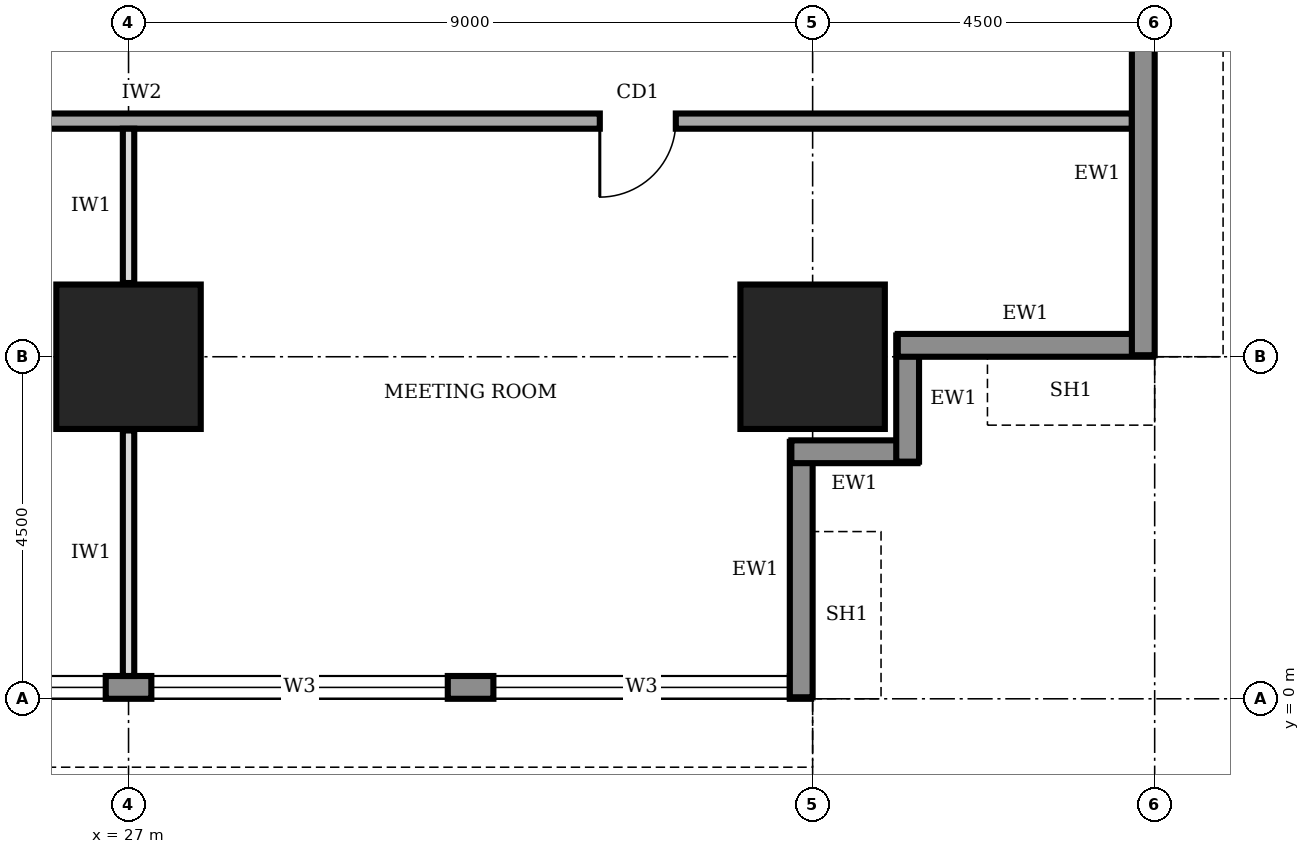
"""IFC4 building model, lengths in metres.
Left out: names, types, materials, properties, quantities, classifications, styles, units other than length and angle.
Written with IfcOpenShell. Run it as: python <this file> out.ifc"""

import sys

from ifc_helpers import new_model, si_unit, direction, frame, frame_2d, origin, origin_2d, place, context, subcontext, project, spatial, rectangle, extrude, element, fill, save


model = new_model("IFC4")
c1 = context("Model", 3, precision=1e-05, world=origin(), true_north=direction((0.0, 1.0)))
c2 = subcontext(c1, "Body", "Model", "MODEL_VIEW")
j1 = project(units=[si_unit("LENGTHUNIT", "METRE"), si_unit("PLANEANGLEUNIT", "RADIAN")], contexts=[c1])
p1 = place(None, origin())
s1 = spatial("IfcSite", under=j1, at=p1, CompositionType="ELEMENT")
p2 = place(p1, origin())
s2 = spatial("IfcBuilding", under=s1, at=p2, CompositionType="ELEMENT")
p3 = place(p2, frame((0.0, 0.0, 93.0)))
s3 = spatial("IfcBuildingStorey", under=s2, at=p3, CompositionType="ELEMENT", Elevation=93.0)
for number, where, z_axis, x_axis in (
    (1, (27.0, 4.5, 0.0), (0.0, 0.0, 1.0), (1.0, 0.0, 0.0)),
    (2, (36.0, 4.5, 0.0), (0.0, 0.0, 1.0), (1.0, 0.0, 0.0)),
):
    element("IfcColumn", number, at=place(p3, frame(where, z_axis=z_axis, x_axis=x_axis)), inside=s3, PredefinedType="COLUMN", context=c2, shape_type="SweptSolid", body=[
        extrude(rectangle(XDim=1.9, YDim=1.9, at=origin_2d()), origin(), (0.0, 0.0, 1.0), 4.0),
    ])
p4 = place(p3, frame((4.52, 0.15, 0.0), z_axis=(0.0, 0.0, 1.0), x_axis=(1.0, 0.0, 0.0)))
e3 = element("IfcWall", 3, at=p4, inside=s3, PredefinedType="STANDARD", context=c2, shape_type="SweptSolid", body=[
    extrude(rectangle(XDim=31.46, YDim=0.3, at=frame_2d((15.73, 0.0))), origin(), (0.0, 0.0, 1.0), 3.75),
])
p5 = place(p4, frame((4.78, 0.0, 0.95)))
e4 = element("IfcOpeningElement", 4, at=p5, cuts=e3, PredefinedType="OPENING", context=c2, shape_type="SweptSolid", body=[
    extrude(rectangle(XDim=3.9, YDim=1.8, at=frame_2d((1.95, 0.9))), frame((0.0, 0.16, 0.0), z_axis=(0.0, -1.0, 0.0), x_axis=(1.0, 0.0, 0.0)), (0.0, 0.0, 1.0), 0.32),
])
p6 = place(p4, frame((9.28, 0.0, 0.95)))
e5 = element("IfcOpeningElement", 5, at=p6, cuts=e3, PredefinedType="OPENING", context=c2, shape_type="SweptSolid", body=[
    extrude(rectangle(XDim=3.9, YDim=1.8, at=frame_2d((1.95, 0.9))), frame((0.0, 0.16, 0.0), z_axis=(0.0, -1.0, 0.0), x_axis=(1.0, 0.0, 0.0)), (0.0, 0.0, 1.0), 0.32),
])
p7 = place(p4, frame((13.78, 0.0, 0.95)))
e6 = element("IfcOpeningElement", 6, at=p7, cuts=e3, PredefinedType="OPENING", context=c2, shape_type="SweptSolid", body=[
    extrude(rectangle(XDim=3.9, YDim=1.8, at=frame_2d((1.95, 0.9))), frame((0.0, 0.16, 0.0), z_axis=(0.0, -1.0, 0.0), x_axis=(1.0, 0.0, 0.0)), (0.0, 0.0, 1.0), 0.32),
])
p8 = place(p4, frame((18.28, 0.0, 0.95)))
e7 = element("IfcOpeningElement", 7, at=p8, cuts=e3, PredefinedType="OPENING", context=c2, shape_type="SweptSolid", body=[
    extrude(rectangle(XDim=3.9, YDim=1.8, at=frame_2d((1.95, 0.9))), frame((0.0, 0.16, 0.0), z_axis=(0.0, -1.0, 0.0), x_axis=(1.0, 0.0, 0.0)), (0.0, 0.0, 1.0), 0.32),
])
p9 = place(p4, frame((22.78, 0.0, 0.95)))
e8 = element("IfcOpeningElement", 8, at=p9, cuts=e3, PredefinedType="OPENING", context=c2, shape_type="SweptSolid", body=[
    extrude(rectangle(XDim=3.9, YDim=1.8, at=frame_2d((1.95, 0.9))), frame((0.0, 0.16, 0.0), z_axis=(0.0, -1.0, 0.0), x_axis=(1.0, 0.0, 0.0)), (0.0, 0.0, 1.0), 0.32),
])
p10 = place(p4, frame((27.28, 0.0, 0.95)))
e9 = element("IfcOpeningElement", 9, at=p10, cuts=e3, PredefinedType="OPENING", context=c2, shape_type="SweptSolid", body=[
    extrude(rectangle(XDim=3.9, YDim=1.8, at=frame_2d((1.95, 0.9))), frame((0.0, 0.16, 0.0), z_axis=(0.0, -1.0, 0.0), x_axis=(1.0, 0.0, 0.0)), (0.0, 0.0, 1.0), 0.32),
])
p11 = place(p3, frame((35.85, 0.02, 0.0), z_axis=(0.0, 0.0, 1.0), x_axis=(0.0, 1.0, 0.0)))
e10 = element("IfcWall", 10, at=p11, inside=s3, PredefinedType="STANDARD", context=c2, shape_type="SweptSolid", body=[
    extrude(rectangle(XDim=3.36, YDim=0.3, at=frame_2d((1.68, 0.0))), origin(), (0.0, 0.0, 1.0), 2.85),
])
for number, where, z_axis, x_axis in (
    (11, (35.72, 3.25, 0.0), (0.0, 0.0, 1.0), (1.0, 0.0, 0.0)),
    (12, (37.25, 3.12, 0.0), (0.0, 0.0, 1.0), (0.0, 1.0, 0.0)),
):
    element("IfcWall", number, at=place(p3, frame(where, z_axis=z_axis, x_axis=x_axis)), inside=s3, PredefinedType="STANDARD", context=c2, shape_type="SweptSolid", body=[
        extrude(rectangle(XDim=1.66, YDim=0.3, at=frame_2d((0.83, 0.0))), origin(), (0.0, 0.0, 1.0), 3.75),
    ])
p12 = place(p3, frame((37.12, 4.65, 0.0), z_axis=(0.0, 0.0, 1.0), x_axis=(1.0, 0.0, 0.0)))
e13 = element("IfcWall", 13, at=p12, inside=s3, PredefinedType="STANDARD", context=c2, shape_type="SweptSolid", body=[
    extrude(rectangle(XDim=3.36, YDim=0.3, at=frame_2d((1.68, 0.0))), origin(), (0.0, 0.0, 1.0), 2.85),
])
p13 = place(p3, frame((40.35, 4.52, 0.0), z_axis=(0.0, 0.0, 1.0), x_axis=(0.0, 1.0, 0.0)))
e14 = element("IfcWall", 14, at=p13, inside=s3, PredefinedType="STANDARD", context=c2, shape_type="SweptSolid", body=[
    extrude(rectangle(XDim=31.46, YDim=0.3, at=frame_2d((15.73, 0.0))), origin(), (0.0, 0.0, 1.0), 3.75),
])
p14 = place(p13, frame((4.78, 0.0, 0.95)))
e15 = element("IfcOpeningElement", 15, at=p14, cuts=e14, PredefinedType="OPENING", context=c2, shape_type="SweptSolid", body=[
    extrude(rectangle(XDim=3.9, YDim=1.8, at=frame_2d((1.95, 0.9))), frame((0.0, 0.16, 0.0), z_axis=(0.0, -1.0, 0.0), x_axis=(1.0, 0.0, 0.0)), (0.0, 0.0, 1.0), 0.32),
])
p15 = place(p13, frame((9.28, 0.0, 0.95)))
e16 = element("IfcOpeningElement", 16, at=p15, cuts=e14, PredefinedType="OPENING", context=c2, shape_type="SweptSolid", body=[
    extrude(rectangle(XDim=3.9, YDim=1.8, at=frame_2d((1.95, 0.9))), frame((0.0, 0.16, 0.0), z_axis=(0.0, -1.0, 0.0), x_axis=(1.0, 0.0, 0.0)), (0.0, 0.0, 1.0), 0.32),
])
p16 = place(p13, frame((13.78, 0.0, 0.95)))
e17 = element("IfcOpeningElement", 17, at=p16, cuts=e14, PredefinedType="OPENING", context=c2, shape_type="SweptSolid", body=[
    extrude(rectangle(XDim=3.9, YDim=1.8, at=frame_2d((1.95, 0.9))), frame((0.0, 0.16, 0.0), z_axis=(0.0, -1.0, 0.0), x_axis=(1.0, 0.0, 0.0)), (0.0, 0.0, 1.0), 0.32),
])
p17 = place(p13, frame((18.28, 0.0, 0.95)))
e18 = element("IfcOpeningElement", 18, at=p17, cuts=e14, PredefinedType="OPENING", context=c2, shape_type="SweptSolid", body=[
    extrude(rectangle(XDim=3.9, YDim=1.8, at=frame_2d((1.95, 0.9))), frame((0.0, 0.16, 0.0), z_axis=(0.0, -1.0, 0.0), x_axis=(1.0, 0.0, 0.0)), (0.0, 0.0, 1.0), 0.32),
])
p18 = place(p13, frame((22.78, 0.0, 0.95)))
e19 = element("IfcOpeningElement", 19, at=p18, cuts=e14, PredefinedType="OPENING", context=c2, shape_type="SweptSolid", body=[
    extrude(rectangle(XDim=3.9, YDim=1.8, at=frame_2d((1.95, 0.9))), frame((0.0, 0.16, 0.0), z_axis=(0.0, -1.0, 0.0), x_axis=(1.0, 0.0, 0.0)), (0.0, 0.0, 1.0), 0.32),
])
p19 = place(p13, frame((27.28, 0.0, 0.95)))
e20 = element("IfcOpeningElement", 20, at=p19, cuts=e14, PredefinedType="OPENING", context=c2, shape_type="SweptSolid", body=[
    extrude(rectangle(XDim=3.9, YDim=1.8, at=frame_2d((1.95, 0.9))), frame((0.0, 0.16, 0.0), z_axis=(0.0, -1.0, 0.0), x_axis=(1.0, 0.0, 0.0)), (0.0, 0.0, 1.0), 0.32),
])
p20 = place(p3, frame((11.9, 7.6, 0.0), z_axis=(0.0, 0.0, 1.0), x_axis=(1.0, 0.0, 0.0)))
e21 = element("IfcWall", 21, at=p20, inside=s3, PredefinedType="SOLIDWALL", context=c2, shape_type="SweptSolid", body=[
    extrude(rectangle(XDim=28.3, YDim=0.2, at=frame_2d((14.15, 0.0))), origin(), (0.0, 0.0, 1.0), 3.75),
])
p21 = place(p20, frame((0.275, 0.0, 0.0)))
e22 = element("IfcOpeningElement", 22, at=p21, cuts=e21, PredefinedType="OPENING", context=c2, shape_type="SweptSolid", body=[
    extrude(rectangle(XDim=1.0, YDim=2.1, at=frame_2d((0.5, 1.05))), frame((0.0, 0.11, 0.0), z_axis=(0.0, -1.0, 0.0), x_axis=(1.0, 0.0, 0.0)), (0.0, 0.0, 1.0), 0.22),
])
p22 = place(p20, frame((7.45, 0.0, 0.0)))
e23 = element("IfcOpeningElement", 23, at=p22, cuts=e21, PredefinedType="OPENING", context=c2, shape_type="SweptSolid", body=[
    extrude(rectangle(XDim=1.8, YDim=2.1, at=frame_2d((0.9, 1.05))), frame((0.0, 0.11, 0.0), z_axis=(0.0, -1.0, 0.0), x_axis=(1.0, 0.0, 0.0)), (0.0, 0.0, 1.0), 0.22),
])
p23 = place(p20, frame((21.3, 0.0, 0.0)))
e24 = element("IfcOpeningElement", 24, at=p23, cuts=e21, PredefinedType="OPENING", context=c2, shape_type="SweptSolid", body=[
    extrude(rectangle(XDim=1.0, YDim=2.1, at=frame_2d((0.5, 1.05))), frame((0.0, 0.11, 0.0), z_axis=(0.0, -1.0, 0.0), x_axis=(1.0, 0.0, 0.0)), (0.0, 0.0, 1.0), 0.22),
])
p24 = place(p3, frame((27.0, 0.3, 0.0), z_axis=(0.0, 0.0, 1.0), x_axis=(0.0, 1.0, 0.0)))
e25 = element("IfcWall", 25, at=p24, inside=s3, PredefinedType="PARTITIONING", context=c2, shape_type="SweptSolid", body=[
    extrude(rectangle(XDim=3.23, YDim=0.15, at=frame_2d((1.615, 0.0))), origin(), (0.0, 0.0, 1.0), 2.85),
])
p25 = place(p3, frame((27.0, 5.47, 0.0), z_axis=(0.0, 0.0, 1.0), x_axis=(0.0, 1.0, 0.0)))
e26 = element("IfcWall", 26, at=p25, inside=s3, PredefinedType="PARTITIONING", context=c2, shape_type="SweptSolid", body=[
    extrude(rectangle(XDim=2.03, YDim=0.15, at=frame_2d((1.015, 0.0))), origin(), (0.0, 0.0, 1.0), 2.85),
])
p26 = place(p8, origin())
e27 = element("IfcWindow", 27, at=p26, inside=s3, PartitioningType="SINGLE_PANEL", PredefinedType="WINDOW", context=c2, shape_type="SweptSolid", body=[
    extrude(rectangle(XDim=3.9, YDim=1.8, at=frame_2d((1.95, 0.9))), frame((0.0, 0.03, 0.0), z_axis=(0.0, -1.0, 0.0), x_axis=(1.0, 0.0, 0.0)), (0.0, 0.0, 1.0), 0.06),
])
fill(e7, e27)
p27 = place(p9, origin())
e28 = element("IfcWindow", 28, at=p27, inside=s3, PartitioningType="SINGLE_PANEL", PredefinedType="WINDOW", context=c2, shape_type="SweptSolid", body=[
    extrude(rectangle(XDim=3.9, YDim=1.8, at=frame_2d((1.95, 0.9))), frame((0.0, 0.03, 0.0), z_axis=(0.0, -1.0, 0.0), x_axis=(1.0, 0.0, 0.0)), (0.0, 0.0, 1.0), 0.06),
])
fill(e8, e28)
p28 = place(p10, origin())
e29 = element("IfcWindow", 29, at=p28, inside=s3, PartitioningType="SINGLE_PANEL", PredefinedType="WINDOW", context=c2, shape_type="SweptSolid", body=[
    extrude(rectangle(XDim=3.9, YDim=1.8, at=frame_2d((1.95, 0.9))), frame((0.0, 0.03, 0.0), z_axis=(0.0, -1.0, 0.0), x_axis=(1.0, 0.0, 0.0)), (0.0, 0.0, 1.0), 0.06),
])
fill(e9, e29)
p29 = place(p23, frame((1.0, 0.0, 0.0), z_axis=(0.0, 0.0, 1.0), x_axis=(-1.0, 0.0, 0.0)))
e30 = element("IfcDoor", 30, at=p29, inside=s3, OperationType="SINGLE_SWING_RIGHT", PredefinedType="DOOR", context=c2, shape_type="SweptSolid", body=[
    extrude(rectangle(XDim=1.0, YDim=2.1, at=frame_2d((0.5, 1.05))), frame((0.0, 0.025, 0.0), z_axis=(0.0, -1.0, 0.0), x_axis=(1.0, 0.0, 0.0)), (0.0, 0.0, 1.0), 0.05),
])
fill(e24, e30)
save(model, sys.argv[1])
